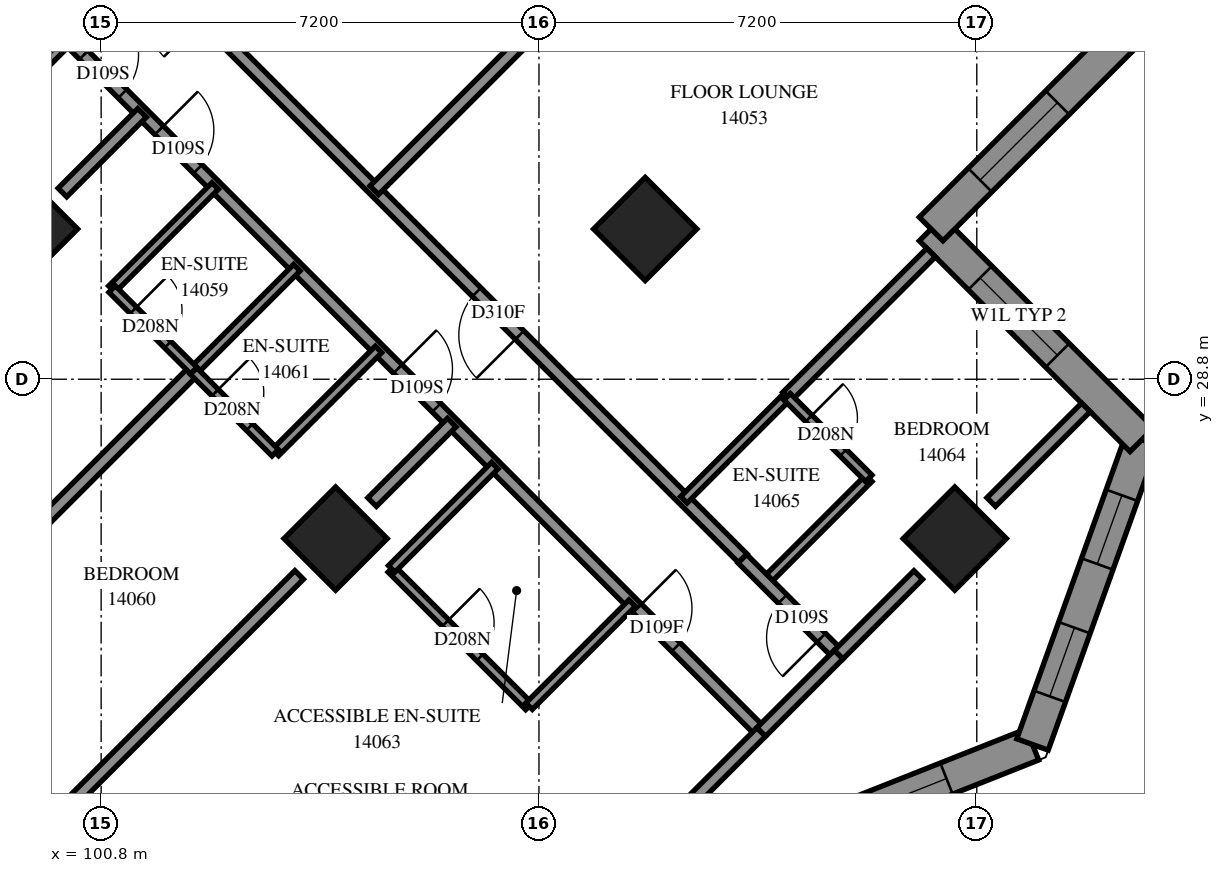
"""IFC4 building model, lengths in metres.
Left out: names, types, materials, properties, quantities, classifications, styles, units other than length and angle.
Written with IfcOpenShell. Run it as: python <this file> out.ifc"""

import sys

from ifc_helpers import new_model, si_unit, direction, frame, frame_2d, origin, origin_2d, place, context, subcontext, project, spatial, polyline, rectangle, outline, extrude, element, fill, save


model = new_model("IFC4")
c1 = context("Model", 3, precision=1e-05, world=origin(), true_north=direction((0.0, 1.0)))
c2 = subcontext(c1, "Body", "Model", "MODEL_VIEW")
j1 = project(units=[si_unit("LENGTHUNIT", "METRE"), si_unit("PLANEANGLEUNIT", "RADIAN")], contexts=[c1])
p1 = place(None, origin())
s1 = spatial("IfcSite", under=j1, at=p1, CompositionType="ELEMENT")
p2 = place(p1, origin())
s2 = spatial("IfcBuilding", under=s1, at=p2, CompositionType="ELEMENT")
p3 = place(p2, frame((0.0, 0.0, 54.2)))
s3 = spatial("IfcBuildingStorey", under=s2, at=p3, CompositionType="ELEMENT", Elevation=54.2)
for number, where, z_axis, x_axis in (
    (1, (99.565, 31.271, 0.0), (0.0, 0.0, 1.0), (0.707, -0.707, 0.0)),
    (2, (109.747, 31.271, 0.0), (0.0, 0.0, 1.0), (0.707, -0.707, 0.0)),
    (3, (104.656, 26.18, 0.0), (0.0, 0.0, 1.0), (0.707, -0.707, 0.0)),
    (4, (114.838, 26.18, 0.0), (0.0, 0.0, 1.0), (0.707, -0.707, 0.0)),
):
    element("IfcColumn", number, at=place(p3, frame(where, z_axis=z_axis, x_axis=x_axis)), inside=s3, PredefinedType="COLUMN", context=c2, shape_type="SweptSolid", body=[
        extrude(rectangle(XDim=1.2, YDim=1.2, at=origin_2d()), origin(), (0.0, 0.0, 1.0), 3.1),
    ])
p4 = place(p3, frame((110.97, 20.755, 0.0), z_axis=(0.0, 0.0, 1.0), x_axis=(0.9297346009, 0.3682303244, 0.0)))
e5 = element("IfcWall", 5, at=p4, inside=s3, PredefinedType="SOLIDWALL", context=c2, shape_type="SweptSolid", body=[
    extrude(outline(polyline([(0.119, -0.275), (5.66, -0.275), (5.411, 0.275), (-0.119, 0.275), (0.119, -0.275)])), origin(), (0.0, 0.0, 1.0), 3.1),
])
p5 = place(p4, frame((1.214, 0.0, 0.5)))
e6 = element("IfcOpeningElement", 6, at=p5, cuts=e5, PredefinedType="OPENING", context=c2, shape_type="SweptSolid", body=[
    extrude(rectangle(XDim=2.8, YDim=2.45, at=frame_2d((1.4, 1.225))), frame((0.0, 0.285, 0.0), z_axis=(0.0, -1.0, 0.0), x_axis=(1.0, 0.0, 0.0)), (0.0, 0.0, 1.0), 0.57),
])
p6 = place(p3, frame((116.117, 22.793, 0.0), z_axis=(0.0, 0.0, 1.0), x_axis=(0.3376911299, 0.9412569791, 0.0)))
e7 = element("IfcWall", 7, at=p6, inside=s3, PredefinedType="SOLIDWALL", context=c2, shape_type="SweptSolid", body=[
    extrude(outline(polyline([(-0.124, -0.275), (5.499, -0.275), (5.15, 0.275), (0.124, 0.275), (-0.124, -0.275)])), origin(), (0.0, 0.0, 1.0), 3.1),
])
p7 = place(p6, frame((0.841, 0.0, 0.5)))
e8 = element("IfcOpeningElement", 8, at=p7, cuts=e7, PredefinedType="OPENING", context=c2, shape_type="SweptSolid", body=[
    extrude(rectangle(XDim=1.2, YDim=2.45, at=frame_2d((0.6, 1.225))), frame((0.0, 0.285, 0.0), z_axis=(0.0, -1.0, 0.0), x_axis=(1.0, 0.0, 0.0)), (0.0, 0.0, 1.0), 0.57),
])
p8 = place(p6, frame((3.154, 0.0, 0.5)))
e9 = element("IfcOpeningElement", 9, at=p8, cuts=e7, PredefinedType="OPENING", context=c2, shape_type="SweptSolid", body=[
    extrude(rectangle(XDim=1.2, YDim=2.45, at=frame_2d((0.6, 1.225))), frame((0.0, 0.285, 0.0), z_axis=(0.0, -1.0, 0.0), x_axis=(1.0, 0.0, 0.0)), (0.0, 0.0, 1.0), 0.57),
])
p9 = place(p3, frame((117.915, 27.805, 0.0), z_axis=(0.0, 0.0, 1.0), x_axis=(-0.7071067812, 0.7071067812, 0.0)))
e10 = element("IfcWall", 10, at=p9, inside=s3, PredefinedType="SOLIDWALL", context=c2, shape_type="SweptSolid", body=[
    extrude(outline(polyline([(-0.174, -0.275), (4.626, -0.275), (5.176, 0.275), (0.174, 0.275), (-0.174, -0.275)])), origin(), (0.0, 0.0, 1.0), 3.1),
])
p10 = place(p9, frame((1.963, 0.0, 0.6)))
e11 = element("IfcOpeningElement", 11, at=p10, cuts=e10, PredefinedType="OPENING", context=c2, shape_type="SweptSolid", body=[
    extrude(rectangle(XDim=1.8, YDim=1.9, at=frame_2d((0.9, 0.95))), frame((0.0, 0.285, 0.0), z_axis=(0.0, -1.0, 0.0), x_axis=(1.0, 0.0, 0.0)), (0.0, 0.0, 1.0), 0.57),
])
p11 = place(p3, frame((114.449, 31.271, 0.0), z_axis=(0.0, 0.0, 1.0), x_axis=(0.7070982134, 0.7071153489, 0.0)))
e12 = element("IfcWall", 12, at=p11, inside=s3, PredefinedType="SOLIDWALL", context=c2, shape_type="SweptSolid", body=[
    extrude(outline(polyline([(0.275, -0.275), (6.217, -0.275), (5.455, 0.275), (-0.275, 0.275), (0.275, -0.275)])), origin(), (0.0, 0.0, 1.0), 3.1),
])
p12 = place(p11, frame((1.137, 0.0, 0.6)))
e13 = element("IfcOpeningElement", 13, at=p12, cuts=e12, PredefinedType="OPENING", context=c2, shape_type="SweptSolid", body=[
    extrude(rectangle(XDim=1.8, YDim=1.9, at=frame_2d((0.9, 0.95))), frame((0.0, 0.285, 0.0), z_axis=(0.0, -1.0, 0.0), x_axis=(1.0, 0.0, 0.0)), (0.0, 0.0, 1.0), 0.57),
])
p13 = place(p3, frame((93.481, 41.167, 0.0), z_axis=(0.0, 0.0, 1.0), x_axis=(0.7071067812, -0.7071067812, 0.0)))
e14 = element("IfcWall", 14, at=p13, inside=s3, PredefinedType="PARTITIONING", context=c2, shape_type="SweptSolid", body=[
    extrude(rectangle(XDim=25.699, YDim=0.2, at=frame_2d((12.85, 0.0))), origin(), (0.0, 0.0, 1.0), 3.1),
])
p14 = place(p13, frame((2.8, 0.0, 0.0)))
e15 = element("IfcOpeningElement", 15, at=p14, cuts=e14, PredefinedType="OPENING", context=c2, shape_type="SweptSolid", body=[
    extrude(rectangle(XDim=0.9, YDim=2.1, at=frame_2d((0.45, 1.05))), frame((0.0, 0.11, 0.0), z_axis=(0.0, -1.0, 0.0), x_axis=(1.0, 0.0, 0.0)), (0.0, 0.0, 1.0), 0.22),
])
p15 = place(p13, frame((9.948, 0.0, 0.0)))
e16 = element("IfcOpeningElement", 16, at=p15, cuts=e14, PredefinedType="OPENING", context=c2, shape_type="SweptSolid", body=[
    extrude(rectangle(XDim=0.9, YDim=2.1, at=frame_2d((0.45, 1.05))), frame((0.0, 0.11, 0.0), z_axis=(0.0, -1.0, 0.0), x_axis=(1.0, 0.0, 0.0)), (0.0, 0.0, 1.0), 0.22),
])
p16 = place(p13, frame((11.7, 0.0, 0.0)))
e17 = element("IfcOpeningElement", 17, at=p16, cuts=e14, PredefinedType="OPENING", context=c2, shape_type="SweptSolid", body=[
    extrude(rectangle(XDim=0.9, YDim=2.1, at=frame_2d((0.45, 1.05))), frame((0.0, 0.11, 0.0), z_axis=(0.0, -1.0, 0.0), x_axis=(1.0, 0.0, 0.0)), (0.0, 0.0, 1.0), 0.22),
])
p17 = place(p13, frame((17.25, 0.0, 0.0)))
e18 = element("IfcOpeningElement", 18, at=p17, cuts=e14, PredefinedType="OPENING", context=c2, shape_type="SweptSolid", body=[
    extrude(rectangle(XDim=0.9, YDim=2.1, at=frame_2d((0.45, 1.05))), frame((0.0, 0.11, 0.0), z_axis=(0.0, -1.0, 0.0), x_axis=(1.0, 0.0, 0.0)), (0.0, 0.0, 1.0), 0.22),
])
p18 = place(p13, frame((22.82, 0.0, 0.0)))
e19 = element("IfcOpeningElement", 19, at=p18, cuts=e14, PredefinedType="OPENING", context=c2, shape_type="SweptSolid", body=[
    extrude(rectangle(XDim=0.9, YDim=2.1, at=frame_2d((0.45, 1.05))), frame((0.0, 0.11, 0.0), z_axis=(0.0, -1.0, 0.0), x_axis=(1.0, 0.0, 0.0)), (0.0, 0.0, 1.0), 0.22),
])
p19 = place(p3, frame((111.352, 25.855, 0.0), z_axis=(0.0, 0.0, 1.0), x_axis=(-0.7070418597, 0.7071716967, 0.0)))
e20 = element("IfcWall", 20, at=p19, inside=s3, PredefinedType="PARTITIONING", context=c2, shape_type="SweptSolid", body=[
    extrude(rectangle(XDim=13.864, YDim=0.2, at=frame_2d((6.932, 0.0))), origin(), (0.0, 0.0, 1.0), 3.1),
])
p20 = place(p19, frame((12.564, 0.0, 0.0)))
e21 = element("IfcOpeningElement", 21, at=p20, cuts=e20, PredefinedType="OPENING", context=c2, shape_type="SweptSolid", body=[
    extrude(rectangle(XDim=0.9, YDim=2.1, at=frame_2d((0.45, 1.05))), frame((0.0, 0.11, 0.0), z_axis=(0.0, -1.0, 0.0), x_axis=(1.0, 0.0, 0.0)), (0.0, 0.0, 1.0), 0.22),
])
p21 = place(p19, frame((5.19, 0.0, 0.0)))
e22 = element("IfcOpeningElement", 22, at=p21, cuts=e20, PredefinedType="OPENING", context=c2, shape_type="SweptSolid", body=[
    extrude(rectangle(XDim=1.0, YDim=2.1, at=frame_2d((0.5, 1.05))), frame((0.0, 0.11, 0.0), z_axis=(0.0, -1.0, 0.0), x_axis=(1.0, 0.0, 0.0)), (0.0, 0.0, 1.0), 0.22),
])
p22 = place(p3, frame((105.292, 31.908, 0.0), z_axis=(0.0, 0.0, 1.0), x_axis=(0.7071067812, 0.7071067812, 0.0)))
e23 = element("IfcWall", 23, at=p22, inside=s3, PredefinedType="PARTITIONING", context=c2, shape_type="SweptSolid", body=[
    extrude(rectangle(XDim=11.033, YDim=0.2, at=frame_2d((5.516, 0.0))), origin(), (0.0, 0.0, 1.0), 3.1),
])
p23 = place(p3, frame((96.524, 23.14, 0.0), z_axis=(0.0, 0.0, 1.0), x_axis=(0.7071128779, 0.7071006844, 0.0)))
e24 = element("IfcWall", 24, at=p23, inside=s3, PredefinedType="PARTITIONING", context=c2, shape_type="SweptSolid", body=[
    extrude(rectangle(XDim=8.201, YDim=0.2, at=frame_2d((4.101, 0.0))), origin(), (0.0, 0.0, 1.0), 3.1),
])
p24 = place(p3, frame((100.162, 21.688, 0.0), z_axis=(0.0, 0.0, 1.0), x_axis=(0.7071067812, 0.7071067812, 0.0)))
e25 = element("IfcWall", 25, at=p24, inside=s3, PredefinedType="PARTITIONING", context=c2, shape_type="SweptSolid", body=[
    extrude(rectangle(XDim=5.507, YDim=0.2, at=frame_2d((2.753, 0.0))), origin(), (0.0, 0.0, 1.0), 3.1),
])
p25 = place(p3, frame((112.079, 28.513, 0.0), z_axis=(0.0, 0.0, 1.0), x_axis=(0.7071067812, 0.7071067812, 0.0)))
e26 = element("IfcWall", 26, at=p25, inside=s3, PredefinedType="PARTITIONING", context=c2, shape_type="SweptSolid", body=[
    extrude(rectangle(XDim=3.351, YDim=0.2, at=frame_2d((1.675, 0.0))), origin(), (0.0, 0.0, 1.0), 3.1),
])
p26 = place(p3, frame((105.573, 25.681, 0.0), z_axis=(0.0, 0.0, 1.0), x_axis=(0.7071067812, -0.7071067812, 0.0)))
e27 = element("IfcWall", 27, at=p26, inside=s3, PredefinedType="PARTITIONING", context=c2, shape_type="SweptSolid", body=[
    extrude(rectangle(XDim=3.199, YDim=0.15, at=frame_2d((1.599, 0.0))), origin(), (0.0, 0.0, 1.0), 3.1),
])
p27 = place(p26, frame((1.258, 0.0, 0.0)))
e28 = element("IfcOpeningElement", 28, at=p27, cuts=e27, PredefinedType="OPENING", context=c2, shape_type="SweptSolid", body=[
    extrude(rectangle(XDim=0.8, YDim=2.1, at=frame_2d((0.4, 1.05))), frame((0.0, 0.085, 0.0), z_axis=(0.0, -1.0, 0.0), x_axis=(1.0, 0.0, 0.0)), (0.0, 0.0, 1.0), 0.17),
])
for number, where, z_axis, x_axis in (
    (29, (100.977, 30.281, 0.0), (0.0, 0.0, 1.0), (0.707, 0.707, 0.0)),
    (30, (111.725, 25.473, 0.0), (0.0, 0.0, 1.0), (0.707, 0.707, 0.0)),
    (31, (98.573, 32.685, 0.0), (0.0, 0.0, 1.0), (0.707, 0.707, 0.0)),
):
    element("IfcWall", number, at=place(p3, frame(where, z_axis=z_axis, x_axis=x_axis)), inside=s3, PredefinedType="PARTITIONING", context=c2, shape_type="SweptSolid", body=[
        extrude(rectangle(XDim=2.401, YDim=0.15, at=frame_2d((1.201, 0.0))), origin(), (0.0, 0.0, 1.0), 3.1),
    ])
p28 = place(p3, frame((105.578, 25.682, 0.0), z_axis=(0.0, 0.0, 1.0), x_axis=(0.706689978, 0.7075233388, 0.0)))
e32 = element("IfcWall", 32, at=p28, inside=s3, PredefinedType="PARTITIONING", context=c2, shape_type="SweptSolid", body=[
    extrude(rectangle(XDim=2.4, YDim=0.15, at=frame_2d((1.2, 0.0))), origin(), (0.0, 0.0, 1.0), 3.1),
])
for number, where, z_axis, x_axis in (
    (33, (110.383, 26.817, 0.0), (0.0, 0.0, 1.0), (0.707, 0.707, 0.0)),
    (34, (102.323, 28.939, 0.0), (0.0, 0.0, 1.0), (0.707, 0.707, 0.0)),
    (35, (103.665, 27.595, 0.0), (0.0, 0.0, 1.0), (0.707, 0.707, 0.0)),
    (36, (107.837, 23.423, 0.0), (0.0, 0.0, 1.0), (0.707, 0.707, 0.0)),
):
    element("IfcWall", number, at=place(p3, frame(where, z_axis=z_axis, x_axis=x_axis)), inside=s3, PredefinedType="PARTITIONING", context=c2, shape_type="SweptSolid", body=[
        extrude(rectangle(XDim=2.398, YDim=0.15, at=frame_2d((1.199, 0.0))), origin(), (0.0, 0.0, 1.0), 3.1),
    ])
p29 = place(p3, frame((112.925, 24.267, 0.0), z_axis=(0.0, 0.0, 1.0), x_axis=(-0.7068383786, 0.707375082, 0.0)))
e37 = element("IfcWall", 37, at=p29, inside=s3, PredefinedType="PARTITIONING", context=c2, shape_type="SweptSolid", body=[
    extrude(rectangle(XDim=2.236, YDim=0.2, at=frame_2d((1.118, 0.0))), origin(), (0.0, 0.0, 1.0), 3.1),
])
p30 = place(p29, frame((0.4, 0.0, 0.0)))
e38 = element("IfcOpeningElement", 38, at=p30, cuts=e37, PredefinedType="OPENING", context=c2, shape_type="SweptSolid", body=[
    extrude(rectangle(XDim=0.9, YDim=2.1, at=frame_2d((0.45, 1.05))), frame((0.0, 0.11, 0.0), z_axis=(0.0, -1.0, 0.0), x_axis=(1.0, 0.0, 0.0)), (0.0, 0.0, 1.0), 0.22),
])
p31 = place(p3, frame((115.438, 26.78, 0.0), z_axis=(0.0, 0.0, 1.0), x_axis=(0.7071067812, 0.7071067812, 0.0)))
e39 = element("IfcWall", 39, at=p31, inside=s3, PredefinedType="PARTITIONING", context=c2, shape_type="SweptSolid", body=[
    extrude(rectangle(XDim=2.201, YDim=0.2, at=frame_2d((1.101, 0.0))), origin(), (0.0, 0.0, 1.0), 3.1),
])
p32 = place(p3, frame((100.981, 30.283, 0.0), z_axis=(0.0, 0.0, 1.0), x_axis=(0.7076330979, -0.7065800724, 0.0)))
e40 = element("IfcWall", 40, at=p32, inside=s3, PredefinedType="PARTITIONING", context=c2, shape_type="SweptSolid", body=[
    extrude(rectangle(XDim=1.899, YDim=0.15, at=frame_2d((0.95, 0.0))), origin(), (0.0, 0.0, 1.0), 3.1),
])
p33 = place(p32, frame((0.493, 0.0, 0.0)))
e41 = element("IfcOpeningElement", 41, at=p33, cuts=e40, PredefinedType="OPENING", context=c2, shape_type="SweptSolid", body=[
    extrude(rectangle(XDim=0.8, YDim=2.1, at=frame_2d((0.4, 1.05))), frame((0.0, 0.085, 0.0), z_axis=(0.0, -1.0, 0.0), x_axis=(1.0, 0.0, 0.0)), (0.0, 0.0, 1.0), 0.17),
])
p34 = place(p3, frame((102.321, 28.935, 0.0), z_axis=(0.0, 0.0, 1.0), x_axis=(0.7065800724, -0.7076330979, 0.0)))
e42 = element("IfcWall", 42, at=p34, inside=s3, PredefinedType="PARTITIONING", context=c2, shape_type="SweptSolid", body=[
    extrude(rectangle(XDim=1.899, YDim=0.15, at=frame_2d((0.95, 0.0))), origin(), (0.0, 0.0, 1.0), 3.1),
])
p35 = place(p34, frame((0.501, 0.0, 0.0)))
e43 = element("IfcOpeningElement", 43, at=p35, cuts=e42, PredefinedType="OPENING", context=c2, shape_type="SweptSolid", body=[
    extrude(rectangle(XDim=0.8, YDim=2.1, at=frame_2d((0.4, 1.05))), frame((0.0, 0.085, 0.0), z_axis=(0.0, -1.0, 0.0), x_axis=(1.0, 0.0, 0.0)), (0.0, 0.0, 1.0), 0.17),
])
p36 = place(p3, frame((112.08, 28.512, 0.0), z_axis=(0.0, 0.0, 1.0), x_axis=(0.7076330979, -0.7065800724, 0.0)))
e44 = element("IfcWall", 44, at=p36, inside=s3, PredefinedType="PARTITIONING", context=c2, shape_type="SweptSolid", body=[
    extrude(rectangle(XDim=1.899, YDim=0.15, at=frame_2d((0.95, 0.0))), origin(), (0.0, 0.0, 1.0), 3.1),
])
p37 = place(p36, frame((0.505, 0.0, 0.0)))
e45 = element("IfcOpeningElement", 45, at=p37, cuts=e44, PredefinedType="OPENING", context=c2, shape_type="SweptSolid", body=[
    extrude(rectangle(XDim=0.8, YDim=2.1, at=frame_2d((0.4, 1.05))), frame((0.0, 0.085, 0.0), z_axis=(0.0, -1.0, 0.0), x_axis=(1.0, 0.0, 0.0)), (0.0, 0.0, 1.0), 0.17),
])
p38 = place(p3, frame((110.346, 21.689, 0.0), z_axis=(0.0, 0.0, 1.0), x_axis=(0.7071067812, 0.7071067812, 0.0)))
e46 = element("IfcWall", 46, at=p38, inside=s3, PredefinedType="PARTITIONING", context=c2, shape_type="SweptSolid", body=[
    extrude(rectangle(XDim=1.853, YDim=0.2, at=frame_2d((0.926, 0.0))), origin(), (0.0, 0.0, 1.0), 2.6),
])
p39 = place(p3, frame((100.163, 31.871, 0.0), z_axis=(0.0, 0.0, 1.0), x_axis=(0.7071067812, 0.7071067812, 0.0)))
e47 = element("IfcWall", 47, at=p39, inside=s3, PredefinedType="PARTITIONING", context=c2, shape_type="SweptSolid", body=[
    extrude(rectangle(XDim=1.853, YDim=0.2, at=frame_2d((0.926, 0.0))), origin(), (0.0, 0.0, 1.0), 3.1),
])
p40 = place(p3, frame((112.927, 24.27, 0.0), z_axis=(0.0, 0.0, 1.0), x_axis=(0.7071067812, 0.7071067812, 0.0)))
e48 = element("IfcWall", 48, at=p40, inside=s3, PredefinedType="PARTITIONING", context=c2, shape_type="SweptSolid", body=[
    extrude(rectangle(XDim=1.853, YDim=0.2, at=frame_2d((0.926, 0.0))), origin(), (0.0, 0.0, 1.0), 2.6),
])
p41 = place(p3, frame((105.256, 26.78, 0.0), z_axis=(0.0, 0.0, 1.0), x_axis=(0.7076467632, 0.7065663865, 0.0)))
e49 = element("IfcWall", 49, at=p41, inside=s3, PredefinedType="PARTITIONING", context=c2, shape_type="SweptSolid", body=[
    extrude(rectangle(XDim=1.851, YDim=0.2, at=frame_2d((0.926, 0.0))), origin(), (0.0, 0.0, 1.0), 3.1),
])
p42 = place(p3, frame((111.656, 22.998, 0.0), z_axis=(0.0, 0.0, 1.0), x_axis=(0.7071067812, 0.7071067812, 0.0)))
e50 = element("IfcWall", 50, at=p42, inside=s3, PredefinedType="PARTITIONING", context=c2, shape_type="SweptSolid", body=[
    extrude(rectangle(XDim=1.799, YDim=0.2, at=frame_2d((0.899, 0.0))), origin(), (0.0, 0.0, 1.0), 2.6),
])
p43 = place(p5, origin())
e51 = element("IfcWindow", 51, at=p43, inside=s3, PartitioningType="SINGLE_PANEL", PredefinedType="WINDOW", context=c2, shape_type="SweptSolid", body=[
    extrude(rectangle(XDim=2.8, YDim=2.45, at=frame_2d((1.4, 1.225))), frame((0.0, 0.155, 0.0), z_axis=(0.0, -1.0, 0.0), x_axis=(1.0, 0.0, 0.0)), (0.0, 0.0, 1.0), 0.06),
])
fill(e6, e51)
p44 = place(p7, origin())
e52 = element("IfcWindow", 52, at=p44, inside=s3, PartitioningType="SINGLE_PANEL", PredefinedType="WINDOW", context=c2, shape_type="SweptSolid", body=[
    extrude(rectangle(XDim=1.2, YDim=2.45, at=frame_2d((0.6, 1.225))), frame((0.0, 0.155, 0.0), z_axis=(0.0, -1.0, 0.0), x_axis=(1.0, 0.0, 0.0)), (0.0, 0.0, 1.0), 0.06),
])
fill(e8, e52)
p45 = place(p8, origin())
e53 = element("IfcWindow", 53, at=p45, inside=s3, PartitioningType="SINGLE_PANEL", PredefinedType="WINDOW", context=c2, shape_type="SweptSolid", body=[
    extrude(rectangle(XDim=1.2, YDim=2.45, at=frame_2d((0.6, 1.225))), frame((0.0, 0.155, 0.0), z_axis=(0.0, -1.0, 0.0), x_axis=(1.0, 0.0, 0.0)), (0.0, 0.0, 1.0), 0.06),
])
fill(e9, e53)
p46 = place(p10, origin())
e54 = element("IfcWindow", 54, at=p46, inside=s3, PartitioningType="SINGLE_PANEL", PredefinedType="WINDOW", context=c2, shape_type="SweptSolid", body=[
    extrude(rectangle(XDim=1.8, YDim=1.9, at=frame_2d((0.9, 0.95))), frame((0.0, 0.155, 0.0), z_axis=(0.0, -1.0, 0.0), x_axis=(1.0, 0.0, 0.0)), (0.0, 0.0, 1.0), 0.06),
])
fill(e11, e54)
p47 = place(p12, origin())
e55 = element("IfcWindow", 55, at=p47, inside=s3, PartitioningType="SINGLE_PANEL", PredefinedType="WINDOW", context=c2, shape_type="SweptSolid", body=[
    extrude(rectangle(XDim=1.8, YDim=1.9, at=frame_2d((0.9, 0.95))), frame((0.0, 0.155, 0.0), z_axis=(0.0, -1.0, 0.0), x_axis=(1.0, 0.0, 0.0)), (0.0, 0.0, 1.0), 0.06),
])
fill(e13, e55)
p48 = place(p21, origin())
e56 = element("IfcDoor", 56, at=p48, inside=s3, OperationType="SINGLE_SWING_RIGHT", PredefinedType="DOOR", context=c2, shape_type="SweptSolid", body=[
    extrude(rectangle(XDim=1.0, YDim=2.1, at=frame_2d((0.5, 1.05))), frame((0.0, 0.025, 0.0), z_axis=(0.0, -1.0, 0.0), x_axis=(1.0, 0.0, 0.0)), (0.0, 0.0, 1.0), 0.05),
])
fill(e22, e56)
p49 = place(p15, origin())
e57 = element("IfcDoor", 57, at=p49, inside=s3, OperationType="SINGLE_SWING_LEFT", PredefinedType="DOOR", context=c2, shape_type="SweptSolid", body=[
    extrude(rectangle(XDim=0.9, YDim=2.1, at=frame_2d((0.45, 1.05))), frame((0.0, 0.025, 0.0), z_axis=(0.0, -1.0, 0.0), x_axis=(1.0, 0.0, 0.0)), (0.0, 0.0, 1.0), 0.05),
])
fill(e16, e57)
p50 = place(p16, origin())
e58 = element("IfcDoor", 58, at=p50, inside=s3, OperationType="SINGLE_SWING_RIGHT", PredefinedType="DOOR", context=c2, shape_type="SweptSolid", body=[
    extrude(rectangle(XDim=0.9, YDim=2.1, at=frame_2d((0.45, 1.05))), frame((0.0, 0.025, 0.0), z_axis=(0.0, -1.0, 0.0), x_axis=(1.0, 0.0, 0.0)), (0.0, 0.0, 1.0), 0.05),
])
fill(e17, e58)
p51 = place(p33, origin())
e59 = element("IfcDoor", 59, at=p51, inside=s3, OperationType="SINGLE_SWING_RIGHT", PredefinedType="DOOR", context=c2, shape_type="SweptSolid", body=[
    extrude(rectangle(XDim=0.8, YDim=2.1, at=frame_2d((0.4, 1.05))), frame((0.0, 0.025, 0.0), z_axis=(0.0, -1.0, 0.0), x_axis=(1.0, 0.0, 0.0)), (0.0, 0.0, 1.0), 0.05),
])
fill(e41, e59)
p52 = place(p17, origin())
e60 = element("IfcDoor", 60, at=p52, inside=s3, OperationType="SINGLE_SWING_LEFT", PredefinedType="DOOR", context=c2, shape_type="SweptSolid", body=[
    extrude(rectangle(XDim=0.9, YDim=2.1, at=frame_2d((0.45, 1.05))), frame((0.0, 0.025, 0.0), z_axis=(0.0, -1.0, 0.0), x_axis=(1.0, 0.0, 0.0)), (0.0, 0.0, 1.0), 0.05),
])
fill(e18, e60)
p53 = place(p35, origin())
e61 = element("IfcDoor", 61, at=p53, inside=s3, OperationType="SINGLE_SWING_RIGHT", PredefinedType="DOOR", context=c2, shape_type="SweptSolid", body=[
    extrude(rectangle(XDim=0.8, YDim=2.1, at=frame_2d((0.4, 1.05))), frame((0.0, 0.025, 0.0), z_axis=(0.0, -1.0, 0.0), x_axis=(1.0, 0.0, 0.0)), (0.0, 0.0, 1.0), 0.05),
])
fill(e43, e61)
p54 = place(p18, origin())
e62 = element("IfcDoor", 62, at=p54, inside=s3, OperationType="SINGLE_SWING_RIGHT", PredefinedType="DOOR", context=c2, shape_type="SweptSolid", body=[
    extrude(rectangle(XDim=0.9, YDim=2.1, at=frame_2d((0.45, 1.05))), frame((0.0, 0.025, 0.0), z_axis=(0.0, -1.0, 0.0), x_axis=(1.0, 0.0, 0.0)), (0.0, 0.0, 1.0), 0.05),
])
fill(e19, e62)
p55 = place(p27, origin())
e63 = element("IfcDoor", 63, at=p55, inside=s3, OperationType="SINGLE_SWING_RIGHT", PredefinedType="DOOR", context=c2, shape_type="SweptSolid", body=[
    extrude(rectangle(XDim=0.8, YDim=2.1, at=frame_2d((0.4, 1.05))), frame((0.0, 0.025, 0.0), z_axis=(0.0, -1.0, 0.0), x_axis=(1.0, 0.0, 0.0)), (0.0, 0.0, 1.0), 0.05),
])
fill(e28, e63)
p56 = place(p30, origin())
e64 = element("IfcDoor", 64, at=p56, inside=s3, OperationType="SINGLE_SWING_RIGHT", PredefinedType="DOOR", context=c2, shape_type="SweptSolid", body=[
    extrude(rectangle(XDim=0.9, YDim=2.1, at=frame_2d((0.45, 1.05))), frame((0.0, 0.025, 0.0), z_axis=(0.0, -1.0, 0.0), x_axis=(1.0, 0.0, 0.0)), (0.0, 0.0, 1.0), 0.05),
])
fill(e38, e64)
p57 = place(p37, origin())
e65 = element("IfcDoor", 65, at=p57, inside=s3, OperationType="SINGLE_SWING_RIGHT", PredefinedType="DOOR", context=c2, shape_type="SweptSolid", body=[
    extrude(rectangle(XDim=0.8, YDim=2.1, at=frame_2d((0.4, 1.05))), frame((0.0, 0.025, 0.0), z_axis=(0.0, -1.0, 0.0), x_axis=(1.0, 0.0, 0.0)), (0.0, 0.0, 1.0), 0.05),
])
fill(e45, e65)
save(model, sys.argv[1])
